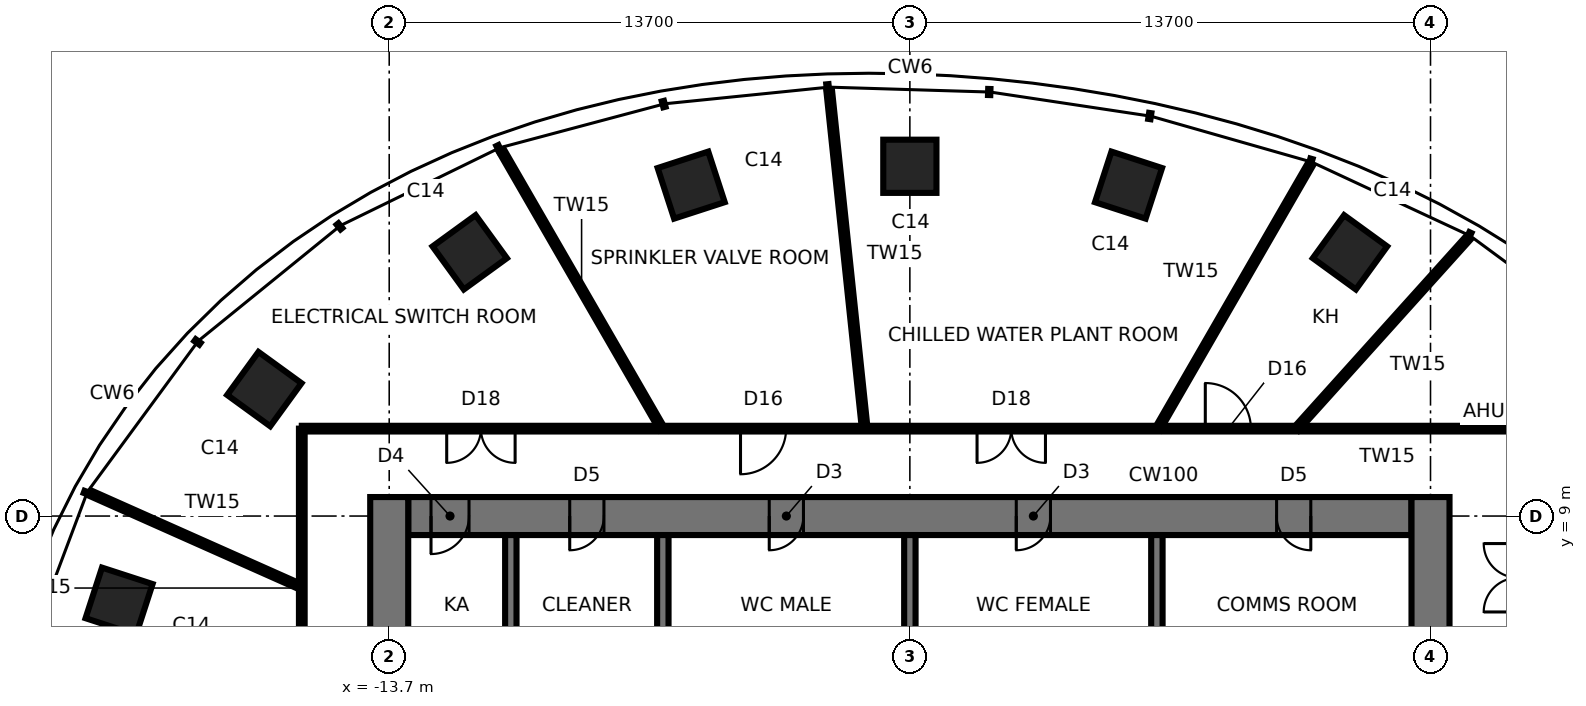
"""IFC4 building model, lengths in metres.
Left out: names, types, materials, properties, quantities, classifications, styles, units other than length and angle.
Written with IfcOpenShell. Run it as: python <this file> out.ifc"""

import sys

from ifc_helpers import new_model, si_unit, direction, frame, frame_2d, origin, origin_2d, place, context, subcontext, project, spatial, rectangle, extrude, element, fill, save


model = new_model("IFC4")
c1 = context("Model", 3, precision=1e-05, world=origin(), true_north=direction((0.0, 1.0)))
c2 = subcontext(c1, "Body", "Model", "MODEL_VIEW")
j1 = project(units=[si_unit("LENGTHUNIT", "METRE"), si_unit("PLANEANGLEUNIT", "RADIAN")], contexts=[c1])
p1 = place(None, origin())
s1 = spatial("IfcSite", under=j1, at=p1, CompositionType="ELEMENT")
p2 = place(p1, origin())
s2 = spatial("IfcBuilding", under=s1, at=p2, CompositionType="ELEMENT")
p3 = place(p2, frame((0.0, 0.0, 246.2)))
s3 = spatial("IfcBuildingStorey", under=s2, at=p3, CompositionType="ELEMENT", Elevation=246.2)
for number, where, z_axis, x_axis in (
    (1, (11.581, 15.94, 0.0), (0.0, 0.0, 1.0), (0.588, 0.809, 0.0)),
    (2, (5.754, 17.708, 0.0), (0.0, 0.0, 1.0), (0.309, 0.951, 0.0)),
    (3, (0.0, 18.204, 0.0), (0.0, 0.0, 1.0), (0.0, 1.0, 0.0)),
    (4, (-5.754, 17.708, 0.0), (0.0, 0.0, 1.0), (-0.309, 0.951, 0.0)),
    (5, (-11.581, 15.94, 0.0), (0.0, 0.0, 1.0), (-0.588, 0.809, 0.0)),
    (6, (-16.986, 12.341, 0.0), (0.0, 0.0, 1.0), (-0.809, 0.588, 0.0)),
    (7, (-20.808, 6.761, 0.0), (0.0, 0.0, 1.0), (-0.951, 0.309, 0.0)),
):
    element("IfcColumn", number, at=place(p3, frame(where, z_axis=z_axis, x_axis=x_axis)), inside=s3, PredefinedType="COLUMN", context=c2, shape_type="SweptSolid", body=[
        extrude(rectangle(XDim=1.4, YDim=1.4, at=origin_2d()), origin(), (0.0, 0.0, 1.0), 5.6),
    ])
p4 = place(p3, frame((13.2, 9.0, 0.0), z_axis=(0.0, 0.0, 1.0), x_axis=(-1.0, 0.0, 0.0)))
e8 = element("IfcWall", 8, at=p4, inside=s3, PredefinedType="SHEAR", context=c2, shape_type="SweptSolid", body=[
    extrude(rectangle(XDim=26.4, YDim=1.0, at=frame_2d((13.2, 0.0))), origin(), (0.0, 0.0, 1.0), 5.6),
])
p5 = place(p4, frame((2.65, 0.0, 0.0)))
e9 = element("IfcOpeningElement", 9, at=p5, cuts=e8, PredefinedType="OPENING", context=c2, shape_type="SweptSolid", body=[
    extrude(rectangle(XDim=0.9, YDim=2.1, at=frame_2d((0.45, 1.05))), frame((0.0, 0.51, 0.0), z_axis=(0.0, -1.0, 0.0), x_axis=(1.0, 0.0, 0.0)), (0.0, 0.0, 1.0), 1.02),
])
p6 = place(p4, frame((9.5, 0.0, 0.0)))
e10 = element("IfcOpeningElement", 10, at=p6, cuts=e8, PredefinedType="OPENING", context=c2, shape_type="SweptSolid", body=[
    extrude(rectangle(XDim=0.9, YDim=2.1, at=frame_2d((0.45, 1.05))), frame((0.0, 0.51, 0.0), z_axis=(0.0, -1.0, 0.0), x_axis=(1.0, 0.0, 0.0)), (0.0, 0.0, 1.0), 1.02),
])
p7 = place(p4, frame((16.0, 0.0, 0.0)))
e11 = element("IfcOpeningElement", 11, at=p7, cuts=e8, PredefinedType="OPENING", context=c2, shape_type="SweptSolid", body=[
    extrude(rectangle(XDim=0.9, YDim=2.1, at=frame_2d((0.45, 1.05))), frame((0.0, 0.51, 0.0), z_axis=(0.0, -1.0, 0.0), x_axis=(1.0, 0.0, 0.0)), (0.0, 0.0, 1.0), 1.02),
])
p8 = place(p4, frame((21.25, 0.0, 0.0)))
e12 = element("IfcOpeningElement", 12, at=p8, cuts=e8, PredefinedType="OPENING", context=c2, shape_type="SweptSolid", body=[
    extrude(rectangle(XDim=0.9, YDim=2.1, at=frame_2d((0.45, 1.05))), frame((0.0, 0.51, 0.0), z_axis=(0.0, -1.0, 0.0), x_axis=(1.0, 0.0, 0.0)), (0.0, 0.0, 1.0), 1.02),
])
p9 = place(p4, frame((24.8, 0.0, 0.0)))
e13 = element("IfcOpeningElement", 13, at=p9, cuts=e8, PredefinedType="OPENING", context=c2, shape_type="SweptSolid", body=[
    extrude(rectangle(XDim=1.0, YDim=2.1, at=frame_2d((0.5, 1.05))), frame((0.0, 0.51, 0.0), z_axis=(0.0, -1.0, 0.0), x_axis=(1.0, 0.0, 0.0)), (0.0, 0.0, 1.0), 1.02),
])
p10 = place(p3, frame((13.7, -9.5, 0.0), z_axis=(0.0, 0.0, 1.0), x_axis=(0.0, 1.0, 0.0)))
e14 = element("IfcWall", 14, at=p10, inside=s3, PredefinedType="SHEAR", context=c2, shape_type="SweptSolid", body=[
    extrude(rectangle(XDim=19.0, YDim=1.0, at=frame_2d((9.5, 0.0))), origin(), (0.0, 0.0, 1.0), 5.6),
])
p11 = place(p10, frame((8.6, 0.0, 0.0)))
e15 = element("IfcOpeningElement", 15, at=p11, cuts=e14, PredefinedType="OPENING", context=c2, shape_type="SweptSolid", body=[
    extrude(rectangle(XDim=1.8, YDim=2.4, at=frame_2d((0.9, 1.2))), frame((0.0, 0.51, 0.0), z_axis=(0.0, -1.0, 0.0), x_axis=(1.0, 0.0, 0.0)), (0.0, 0.0, 1.0), 1.02),
])
p12 = place(p3, frame((-13.7, 9.5, 0.0), z_axis=(0.0, 0.0, 1.0), x_axis=(0.0, -1.0, 0.0)))
e16 = element("IfcWall", 16, at=p12, inside=s3, PredefinedType="SHEAR", context=c2, shape_type="SweptSolid", body=[
    extrude(rectangle(XDim=19.0, YDim=1.0, at=frame_2d((9.5, 0.0))), origin(), (0.0, 0.0, 1.0), 5.6),
])
p13 = place(p12, frame((8.6, 0.0, 0.0)))
e17 = element("IfcOpeningElement", 17, at=p13, cuts=e16, PredefinedType="OPENING", context=c2, shape_type="SweptSolid", body=[
    extrude(rectangle(XDim=1.8, YDim=2.4, at=frame_2d((0.9, 1.2))), frame((0.0, 0.51, 0.0), z_axis=(0.0, -1.0, 0.0), x_axis=(1.0, 0.0, 0.0)), (0.0, 0.0, 1.0), 1.02),
])
for number, where, z_axis, x_axis in (
    (18, (-6.5, 4.75, 0.0), (0.0, 0.0, 1.0), (0.0, 1.0, 0.0)),
    (19, (6.5, 4.75, 0.0), (0.0, 0.0, 1.0), (0.0, 1.0, 0.0)),
    (20, (0.0, 4.75, 0.0), (0.0, 0.0, 1.0), (0.0, 1.0, 0.0)),
    (21, (-10.5, 4.75, 0.0), (0.0, 0.0, 1.0), (0.0, 1.0, 0.0)),
):
    element("IfcWall", number, at=place(p3, frame(where, z_axis=z_axis, x_axis=x_axis)), inside=s3, PredefinedType="SHEAR", context=c2, shape_type="SweptSolid", body=[
        extrude(rectangle(XDim=3.75, YDim=0.3, at=frame_2d((1.875, 0.0))), origin(), (0.0, 0.0, 1.0), 5.6),
    ])
p14 = place(p3, frame((10.175, 11.3, 0.0), z_axis=(0.0, 0.0, 1.0), x_axis=(0.669122640064, 0.743151998284, 0.0)))
e22 = element("IfcWall", 22, at=p14, inside=s3, PredefinedType="PARTITIONING", context=c2, shape_type="SweptSolid", body=[
    extrude(rectangle(XDim=6.748, YDim=0.15, at=frame_2d((3.374, 0.0))), origin(), (0.0, 0.0, 1.0), 5.4),
])
p15 = place(p3, frame((6.524, 11.3, 0.0), z_axis=(0.0, 0.0, 1.0), x_axis=(0.499985955615, 0.866033512162, 0.0)))
e23 = element("IfcWall", 23, at=p15, inside=s3, PredefinedType="PARTITIONING", context=c2, shape_type="SweptSolid", body=[
    extrude(rectangle(XDim=8.02, YDim=0.15, at=frame_2d((4.01, 0.0))), origin(), (0.0, 0.0, 1.0), 5.4),
])
p16 = place(p3, frame((16.0, 11.3, 0.0), z_axis=(0.0, 0.0, 1.0), x_axis=(-1.0, 0.0, 0.0)))
e24 = element("IfcWall", 24, at=p16, inside=s3, PredefinedType="PARTITIONING", context=c2, shape_type="SweptSolid", body=[
    extrude(rectangle(XDim=32.0, YDim=0.15, at=frame_2d((16.0, 0.0))), origin(), (0.0, 0.0, 1.0), 5.4),
])
p17 = place(p16, frame((7.026, 0.0, 0.0)))
e25 = element("IfcOpeningElement", 25, at=p17, cuts=e24, PredefinedType="OPENING", context=c2, shape_type="SweptSolid", body=[
    extrude(rectangle(XDim=1.2, YDim=2.1, at=frame_2d((0.6, 1.05))), frame((0.0, 0.085, 0.0), z_axis=(0.0, -1.0, 0.0), x_axis=(1.0, 0.0, 0.0)), (0.0, 0.0, 1.0), 0.17),
])
p18 = place(p16, frame((12.432, 0.0, 0.0)))
e26 = element("IfcOpeningElement", 26, at=p18, cuts=e24, PredefinedType="OPENING", context=c2, shape_type="SweptSolid", body=[
    extrude(rectangle(XDim=1.8, YDim=2.4, at=frame_2d((0.9, 1.2))), frame((0.0, 0.085, 0.0), z_axis=(0.0, -1.0, 0.0), x_axis=(1.0, 0.0, 0.0)), (0.0, 0.0, 1.0), 0.17),
])
p19 = place(p16, frame((19.256, 0.0, 0.0)))
e27 = element("IfcOpeningElement", 27, at=p19, cuts=e24, PredefinedType="OPENING", context=c2, shape_type="SweptSolid", body=[
    extrude(rectangle(XDim=1.2, YDim=2.1, at=frame_2d((0.6, 1.05))), frame((0.0, 0.085, 0.0), z_axis=(0.0, -1.0, 0.0), x_axis=(1.0, 0.0, 0.0)), (0.0, 0.0, 1.0), 0.17),
])
p20 = place(p16, frame((26.387, 0.0, 0.0)))
e28 = element("IfcOpeningElement", 28, at=p20, cuts=e24, PredefinedType="OPENING", context=c2, shape_type="SweptSolid", body=[
    extrude(rectangle(XDim=1.8, YDim=2.4, at=frame_2d((0.9, 1.2))), frame((0.0, 0.085, 0.0), z_axis=(0.0, -1.0, 0.0), x_axis=(1.0, 0.0, 0.0)), (0.0, 0.0, 1.0), 0.17),
])
p21 = place(p3, frame((-1.188, 11.3, 0.0), z_axis=(0.0, 0.0, 1.0), x_axis=(-0.104514501891, 0.994523362669, 0.0)))
e29 = element("IfcWall", 29, at=p21, inside=s3, PredefinedType="PARTITIONING", context=c2, shape_type="SweptSolid", body=[
    extrude(rectangle(XDim=8.956, YDim=0.15, at=frame_2d((4.478, 0.0))), origin(), (0.0, 0.0, 1.0), 5.4),
])
p22 = place(p3, frame((-6.524, 11.3, 0.0), z_axis=(0.0, 0.0, 1.0), x_axis=(-0.500005748546, 0.866022084834, 0.0)))
e30 = element("IfcWall", 30, at=p22, inside=s3, PredefinedType="PARTITIONING", context=c2, shape_type="SweptSolid", body=[
    extrude(rectangle(XDim=8.455, YDim=0.15, at=frame_2d((4.227, 0.0))), origin(), (0.0, 0.0, 1.0), 5.4),
])
p23 = place(p3, frame((-16.0, 7.124, 0.0), z_axis=(0.0, 0.0, 1.0), x_axis=(-0.913547117463, 0.406732915039, 0.0)))
e31 = element("IfcWall", 31, at=p23, inside=s3, PredefinedType="PARTITIONING", context=c2, shape_type="SweptSolid", body=[
    extrude(rectangle(XDim=6.096, YDim=0.15, at=frame_2d((3.048, 0.0))), origin(), (0.0, 0.0, 1.0), 5.4),
])
p24 = place(p3, frame((-16.0, 11.3, 0.0), z_axis=(0.0, 0.0, 1.0), x_axis=(0.0, -1.0, 0.0)))
e32 = element("IfcWall", 32, at=p24, inside=s3, PredefinedType="PARTITIONING", context=c2, shape_type="SweptSolid", body=[
    extrude(rectangle(XDim=22.6, YDim=0.15, at=frame_2d((11.3, 0.0))), origin(), (0.0, 0.0, 1.0), 5.4),
])
p25 = place(p24, frame((8.539, 0.0, 0.0)))
e33 = element("IfcOpeningElement", 33, at=p25, cuts=e32, PredefinedType="OPENING", context=c2, shape_type="SweptSolid", body=[
    extrude(rectangle(XDim=1.8, YDim=2.4, at=frame_2d((0.9, 1.2))), frame((0.0, 0.085, 0.0), z_axis=(0.0, -1.0, 0.0), x_axis=(1.0, 0.0, 0.0)), (0.0, 0.0, 1.0), 0.17),
])
p26 = place(p24, frame((17.725, 0.0, 0.0)))
e34 = element("IfcOpeningElement", 34, at=p26, cuts=e32, PredefinedType="OPENING", context=c2, shape_type="SweptSolid", body=[
    extrude(rectangle(XDim=1.8, YDim=2.4, at=frame_2d((0.9, 1.2))), frame((0.0, 0.085, 0.0), z_axis=(0.0, -1.0, 0.0), x_axis=(1.0, 0.0, 0.0)), (0.0, 0.0, 1.0), 0.17),
])
p27 = place(p5, origin())
e35 = element("IfcDoor", 35, at=p27, inside=s3, OperationType="SINGLE_SWING_LEFT", PredefinedType="DOOR", context=c2, shape_type="SweptSolid", body=[
    extrude(rectangle(XDim=0.82, YDim=2.06, at=frame_2d((0.45, 1.03))), frame((0.0, 0.025, 0.0), z_axis=(0.0, -1.0, 0.0), x_axis=(1.0, 0.0, 0.0)), (0.0, 0.0, 1.0), 0.05),
    extrude(rectangle(XDim=0.04, YDim=2.1, at=frame_2d((0.02, 1.05))), frame((0.0, 0.25, 0.0), z_axis=(0.0, -1.0, 0.0), x_axis=(1.0, 0.0, 0.0)), (0.0, 0.0, 1.0), 0.5),
    extrude(rectangle(XDim=0.04, YDim=2.1, at=frame_2d((0.88, 1.05))), frame((0.0, 0.25, 0.0), z_axis=(0.0, -1.0, 0.0), x_axis=(1.0, 0.0, 0.0)), (0.0, 0.0, 1.0), 0.5),
    extrude(rectangle(XDim=0.82, YDim=0.04, at=frame_2d((0.45, 2.08))), frame((0.0, 0.25, 0.0), z_axis=(0.0, -1.0, 0.0), x_axis=(1.0, 0.0, 0.0)), (0.0, 0.0, 1.0), 0.5),
])
fill(e9, e35)
p28 = place(p6, origin())
e36 = element("IfcDoor", 36, at=p28, inside=s3, OperationType="SINGLE_SWING_RIGHT", PredefinedType="DOOR", context=c2, shape_type="SweptSolid", body=[
    extrude(rectangle(XDim=0.82, YDim=2.06, at=frame_2d((0.45, 1.03))), frame((0.0, 0.025, 0.0), z_axis=(0.0, -1.0, 0.0), x_axis=(1.0, 0.0, 0.0)), (0.0, 0.0, 1.0), 0.05),
    extrude(rectangle(XDim=0.04, YDim=2.1, at=frame_2d((0.02, 1.05))), frame((0.0, 0.25, 0.0), z_axis=(0.0, -1.0, 0.0), x_axis=(1.0, 0.0, 0.0)), (0.0, 0.0, 1.0), 0.5),
    extrude(rectangle(XDim=0.04, YDim=2.1, at=frame_2d((0.88, 1.05))), frame((0.0, 0.25, 0.0), z_axis=(0.0, -1.0, 0.0), x_axis=(1.0, 0.0, 0.0)), (0.0, 0.0, 1.0), 0.5),
    extrude(rectangle(XDim=0.82, YDim=0.04, at=frame_2d((0.45, 2.08))), frame((0.0, 0.25, 0.0), z_axis=(0.0, -1.0, 0.0), x_axis=(1.0, 0.0, 0.0)), (0.0, 0.0, 1.0), 0.5),
])
fill(e10, e36)
p29 = place(p7, origin())
e37 = element("IfcDoor", 37, at=p29, inside=s3, OperationType="SINGLE_SWING_RIGHT", PredefinedType="DOOR", context=c2, shape_type="SweptSolid", body=[
    extrude(rectangle(XDim=0.82, YDim=2.06, at=frame_2d((0.45, 1.03))), frame((0.0, 0.025, 0.0), z_axis=(0.0, -1.0, 0.0), x_axis=(1.0, 0.0, 0.0)), (0.0, 0.0, 1.0), 0.05),
    extrude(rectangle(XDim=0.04, YDim=2.1, at=frame_2d((0.02, 1.05))), frame((0.0, 0.25, 0.0), z_axis=(0.0, -1.0, 0.0), x_axis=(1.0, 0.0, 0.0)), (0.0, 0.0, 1.0), 0.5),
    extrude(rectangle(XDim=0.04, YDim=2.1, at=frame_2d((0.88, 1.05))), frame((0.0, 0.25, 0.0), z_axis=(0.0, -1.0, 0.0), x_axis=(1.0, 0.0, 0.0)), (0.0, 0.0, 1.0), 0.5),
    extrude(rectangle(XDim=0.82, YDim=0.04, at=frame_2d((0.45, 2.08))), frame((0.0, 0.25, 0.0), z_axis=(0.0, -1.0, 0.0), x_axis=(1.0, 0.0, 0.0)), (0.0, 0.0, 1.0), 0.5),
])
fill(e11, e37)
p30 = place(p8, origin())
e38 = element("IfcDoor", 38, at=p30, inside=s3, OperationType="SINGLE_SWING_RIGHT", PredefinedType="DOOR", context=c2, shape_type="SweptSolid", body=[
    extrude(rectangle(XDim=0.82, YDim=2.06, at=frame_2d((0.45, 1.03))), frame((0.0, 0.025, 0.0), z_axis=(0.0, -1.0, 0.0), x_axis=(1.0, 0.0, 0.0)), (0.0, 0.0, 1.0), 0.05),
    extrude(rectangle(XDim=0.04, YDim=2.1, at=frame_2d((0.02, 1.05))), frame((0.0, 0.25, 0.0), z_axis=(0.0, -1.0, 0.0), x_axis=(1.0, 0.0, 0.0)), (0.0, 0.0, 1.0), 0.5),
    extrude(rectangle(XDim=0.04, YDim=2.1, at=frame_2d((0.88, 1.05))), frame((0.0, 0.25, 0.0), z_axis=(0.0, -1.0, 0.0), x_axis=(1.0, 0.0, 0.0)), (0.0, 0.0, 1.0), 0.5),
    extrude(rectangle(XDim=0.82, YDim=0.04, at=frame_2d((0.45, 2.08))), frame((0.0, 0.25, 0.0), z_axis=(0.0, -1.0, 0.0), x_axis=(1.0, 0.0, 0.0)), (0.0, 0.0, 1.0), 0.5),
])
fill(e12, e38)
p31 = place(p9, origin())
e39 = element("IfcDoor", 39, at=p31, inside=s3, OperationType="SINGLE_SWING_RIGHT", PredefinedType="DOOR", context=c2, shape_type="SweptSolid", body=[
    extrude(rectangle(XDim=0.92, YDim=2.06, at=frame_2d((0.5, 1.03))), frame((0.0, 0.025, 0.0), z_axis=(0.0, -1.0, 0.0), x_axis=(1.0, 0.0, 0.0)), (0.0, 0.0, 1.0), 0.05),
    extrude(rectangle(XDim=0.04, YDim=2.1, at=frame_2d((0.02, 1.05))), frame((0.0, 0.25, 0.0), z_axis=(0.0, -1.0, 0.0), x_axis=(1.0, 0.0, 0.0)), (0.0, 0.0, 1.0), 0.5),
    extrude(rectangle(XDim=0.04, YDim=2.1, at=frame_2d((0.98, 1.05))), frame((0.0, 0.25, 0.0), z_axis=(0.0, -1.0, 0.0), x_axis=(1.0, 0.0, 0.0)), (0.0, 0.0, 1.0), 0.5),
    extrude(rectangle(XDim=0.92, YDim=0.04, at=frame_2d((0.5, 2.08))), frame((0.0, 0.25, 0.0), z_axis=(0.0, -1.0, 0.0), x_axis=(1.0, 0.0, 0.0)), (0.0, 0.0, 1.0), 0.5),
])
fill(e13, e39)
p32 = place(p17, frame((1.2, 0.0, 0.0), z_axis=(0.0, 0.0, 1.0), x_axis=(-1.0, 0.0, 0.0)))
e40 = element("IfcDoor", 40, at=p32, inside=s3, OperationType="SINGLE_SWING_LEFT", PredefinedType="DOOR", context=c2, shape_type="SweptSolid", body=[
    extrude(rectangle(XDim=1.2, YDim=2.1, at=frame_2d((0.6, 1.05))), frame((0.0, 0.025, 0.0), z_axis=(0.0, -1.0, 0.0), x_axis=(1.0, 0.0, 0.0)), (0.0, 0.0, 1.0), 0.05),
])
fill(e25, e40)
p33 = place(p18, origin())
e41 = element("IfcDoor", 41, at=p33, inside=s3, OperationType="DOUBLE_DOOR_SINGLE_SWING", PredefinedType="DOOR", context=c2, shape_type="SweptSolid", body=[
    extrude(rectangle(XDim=1.8, YDim=2.4, at=frame_2d((0.9, 1.2))), frame((0.0, 0.025, 0.0), z_axis=(0.0, -1.0, 0.0), x_axis=(1.0, 0.0, 0.0)), (0.0, 0.0, 1.0), 0.05),
])
fill(e26, e41)
p34 = place(p19, origin())
e42 = element("IfcDoor", 42, at=p34, inside=s3, OperationType="SINGLE_SWING_RIGHT", PredefinedType="DOOR", context=c2, shape_type="SweptSolid", body=[
    extrude(rectangle(XDim=1.2, YDim=2.1, at=frame_2d((0.6, 1.05))), frame((0.0, 0.025, 0.0), z_axis=(0.0, -1.0, 0.0), x_axis=(1.0, 0.0, 0.0)), (0.0, 0.0, 1.0), 0.05),
])
fill(e27, e42)
p35 = place(p20, origin())
e43 = element("IfcDoor", 43, at=p35, inside=s3, OperationType="DOUBLE_DOOR_SINGLE_SWING", PredefinedType="DOOR", context=c2, shape_type="SweptSolid", body=[
    extrude(rectangle(XDim=1.8, YDim=2.4, at=frame_2d((0.9, 1.2))), frame((0.0, 0.025, 0.0), z_axis=(0.0, -1.0, 0.0), x_axis=(1.0, 0.0, 0.0)), (0.0, 0.0, 1.0), 0.05),
])
fill(e28, e43)
save(model, sys.argv[1])
